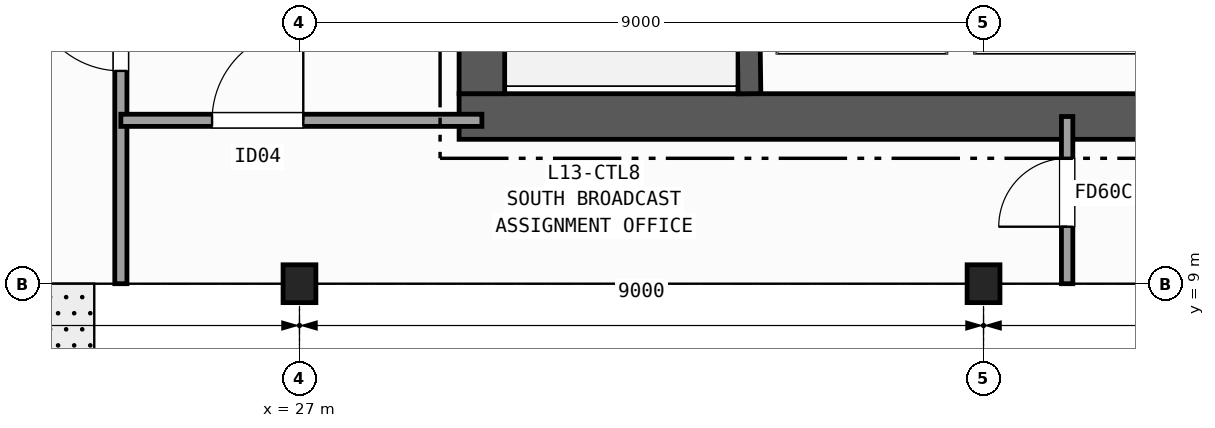
"""IFC4 building model, lengths in metres.
Left out: names, types, materials, properties, quantities, classifications, styles, units other than length and angle.
Written with IfcOpenShell. Run it as: python <this file> out.ifc"""

import sys

from ifc_helpers import new_model, si_unit, direction, frame, frame_2d, origin, origin_2d, place, context, subcontext, project, spatial, rectangle, i_section, extrude, element, fill, save


model = new_model("IFC4")
c1 = context("Model", 3, precision=1e-05, world=origin(), true_north=direction((0.0, 1.0)))
c2 = subcontext(c1, "Body", "Model", "MODEL_VIEW")
j1 = project(units=[si_unit("LENGTHUNIT", "METRE"), si_unit("PLANEANGLEUNIT", "RADIAN")], contexts=[c1])
p1 = place(None, origin())
s1 = spatial("IfcSite", under=j1, at=p1, CompositionType="ELEMENT")
p2 = place(p1, origin())
s2 = spatial("IfcBuilding", under=s1, at=p2, CompositionType="ELEMENT")
p3 = place(p2, frame((0.0, 0.0, 58.2)))
s3 = spatial("IfcBuildingStorey", under=s2, at=p3, CompositionType="ELEMENT", Elevation=58.2)
for number, where, z_axis, x_axis in (
    (1, (27.0, 9.0, 0.0), (0.0, 0.0, 1.0), (1.0, 0.0, 0.0)),
    (2, (36.0, 9.0, 0.0), (0.0, 0.0, 1.0), (1.0, 0.0, 0.0)),
):
    element("IfcColumn", number, at=place(p3, frame(where, z_axis=z_axis, x_axis=x_axis)), inside=s3, PredefinedType="COLUMN", context=c2, shape_type="SweptSolid", body=[
        extrude(i_section(OverallWidth=0.432, OverallDepth=0.498, WebThickness=0.056, FlangeThickness=0.089, FilletRadius=0.015, at=origin_2d()), origin(), (0.0, 0.0, 1.0), 3.7),
    ])
p4 = place(p3, frame((29.1, 11.2, 0.0), z_axis=(0.0, 0.0, 1.0), x_axis=(1.0, 0.0, 0.0)))
e3 = element("IfcWall", 3, at=p4, inside=s3, PredefinedType="SHEAR", context=c2, shape_type="SweptSolid", body=[
    extrude(rectangle(XDim=14.0, YDim=0.6, at=frame_2d((7.0, 0.0))), origin(), (0.0, 0.0, 1.0), 3.42),
])
p5 = place(p3, frame((29.4, 24.3, 0.0), z_axis=(0.0, 0.0, 1.0), x_axis=(0.0, -1.0, 0.0)))
e4 = element("IfcWall", 4, at=p5, inside=s3, PredefinedType="SHEAR", context=c2, shape_type="SweptSolid", body=[
    extrude(rectangle(XDim=12.8, YDim=0.6, at=frame_2d((6.4, 0.0))), origin(), (0.0, 0.0, 1.0), 3.42),
])
p6 = place(p5, frame((1.4, 0.0, 0.0)))
e5 = element("IfcOpeningElement", 5, at=p6, cuts=e4, PredefinedType="OPENING", context=c2, shape_type="SweptSolid", body=[
    extrude(rectangle(XDim=1.35, YDim=2.15, at=frame_2d((0.675, 1.075))), frame((0.0, 0.31, 0.0), z_axis=(0.0, -1.0, 0.0), x_axis=(1.0, 0.0, 0.0)), (0.0, 0.0, 1.0), 0.62),
])
p7 = place(p3, frame((32.92, 11.5, 0.0), z_axis=(0.0, 0.0, 1.0), x_axis=(-0.013244407292, 0.999912288991, 0.0)))
e6 = element("IfcWall", 6, at=p7, inside=s3, PredefinedType="SHEAR", context=c2, shape_type="SweptSolid", body=[
    extrude(rectangle(XDim=9.051, YDim=0.3, at=frame_2d((4.525, 0.0))), origin(), (0.0, 0.0, 1.0), 3.42),
])
p8 = place(p3, frame((24.65, 9.0, 0.0), z_axis=(0.0, 0.0, 1.0), x_axis=(0.0, 1.0, 0.0)))
e7 = element("IfcWall", 7, at=p8, inside=s3, PredefinedType="PARTITIONING", context=c2, shape_type="SweptSolid", body=[
    extrude(rectangle(XDim=19.2, YDim=0.16, at=frame_2d((9.6, 0.0))), origin(), (0.0, 0.0, 1.0), 2.627),
])
p9 = place(p8, frame((2.8, 0.0, 0.0)))
e8 = element("IfcOpeningElement", 8, at=p9, cuts=e7, PredefinedType="OPENING", context=c2, shape_type="SweptSolid", body=[
    extrude(rectangle(XDim=1.2, YDim=2.15, at=frame_2d((0.6, 1.075))), frame((0.0, 0.09, 0.0), z_axis=(0.0, -1.0, 0.0), x_axis=(1.0, 0.0, 0.0)), (0.0, 0.0, 1.0), 0.18),
])
p10 = place(p8, frame((10.59, 0.0, 0.0)))
e9 = element("IfcOpeningElement", 9, at=p10, cuts=e7, PredefinedType="OPENING", context=c2, shape_type="SweptSolid", body=[
    extrude(rectangle(XDim=0.86, YDim=2.05, at=frame_2d((0.43, 1.025))), frame((0.0, 0.09, 0.0), z_axis=(0.0, -1.0, 0.0), x_axis=(1.0, 0.0, 0.0)), (0.0, 0.0, 1.0), 0.18),
])
p11 = place(p3, frame((24.65, 11.15, 0.0), z_axis=(0.0, 0.0, 1.0), x_axis=(1.0, 0.0, 0.0)))
e10 = element("IfcWall", 10, at=p11, inside=s3, PredefinedType="PARTITIONING", context=c2, shape_type="SweptSolid", body=[
    extrude(rectangle(XDim=4.75, YDim=0.16, at=frame_2d((2.375, 0.0))), origin(), (0.0, 0.0, 1.0), 2.792),
])
p12 = place(p11, frame((1.2, 0.0, 0.0)))
e11 = element("IfcOpeningElement", 11, at=p12, cuts=e10, PredefinedType="OPENING", context=c2, shape_type="SweptSolid", body=[
    extrude(rectangle(XDim=1.2, YDim=2.15, at=frame_2d((0.6, 1.075))), frame((0.0, 0.09, 0.0), z_axis=(0.0, -1.0, 0.0), x_axis=(1.0, 0.0, 0.0)), (0.0, 0.0, 1.0), 0.18),
])
p13 = place(p3, frame((37.1, 9.0, 0.0), z_axis=(0.0, 0.0, 1.0), x_axis=(0.0, 1.0, 0.0)))
e12 = element("IfcWall", 12, at=p13, inside=s3, PredefinedType="PARTITIONING", context=c2, shape_type="SweptSolid", body=[
    extrude(rectangle(XDim=2.2, YDim=0.15, at=frame_2d((1.1, 0.0))), origin(), (0.0, 0.0, 1.0), 2.627),
])
p14 = place(p13, frame((0.75, 0.0, 0.0)))
e13 = element("IfcOpeningElement", 13, at=p14, cuts=e12, PredefinedType="OPENING", context=c2, shape_type="SweptSolid", body=[
    extrude(rectangle(XDim=0.9, YDim=2.1, at=frame_2d((0.45, 1.05))), frame((0.0, 0.085, 0.0), z_axis=(0.0, -1.0, 0.0), x_axis=(1.0, 0.0, 0.0)), (0.0, 0.0, 1.0), 0.17),
])
p15 = place(p9, origin())
e14 = element("IfcDoor", 14, at=p15, inside=s3, OperationType="SINGLE_SWING_RIGHT", PredefinedType="DOOR", context=c2, shape_type="SweptSolid", body=[
    extrude(rectangle(XDim=1.2, YDim=2.15, at=frame_2d((0.6, 1.075))), frame((0.0, 0.025, 0.0), z_axis=(0.0, -1.0, 0.0), x_axis=(1.0, 0.0, 0.0)), (0.0, 0.0, 1.0), 0.05),
])
fill(e8, e14)
p16 = place(p12, origin())
e15 = element("IfcDoor", 15, at=p16, inside=s3, OperationType="SINGLE_SWING_RIGHT", PredefinedType="DOOR", context=c2, shape_type="SweptSolid", body=[
    extrude(rectangle(XDim=1.2, YDim=2.15, at=frame_2d((0.6, 1.075))), frame((0.0, 0.025, 0.0), z_axis=(0.0, -1.0, 0.0), x_axis=(1.0, 0.0, 0.0)), (0.0, 0.0, 1.0), 0.05),
])
fill(e11, e15)
p17 = place(p14, origin())
e16 = element("IfcDoor", 16, at=p17, inside=s3, OperationType="SINGLE_SWING_LEFT", PredefinedType="DOOR", context=c2, shape_type="SweptSolid", body=[
    extrude(rectangle(XDim=0.9, YDim=2.1, at=frame_2d((0.45, 1.05))), frame((0.0, 0.025, 0.0), z_axis=(0.0, -1.0, 0.0), x_axis=(1.0, 0.0, 0.0)), (0.0, 0.0, 1.0), 0.05),
])
fill(e13, e16)
save(model, sys.argv[1])
